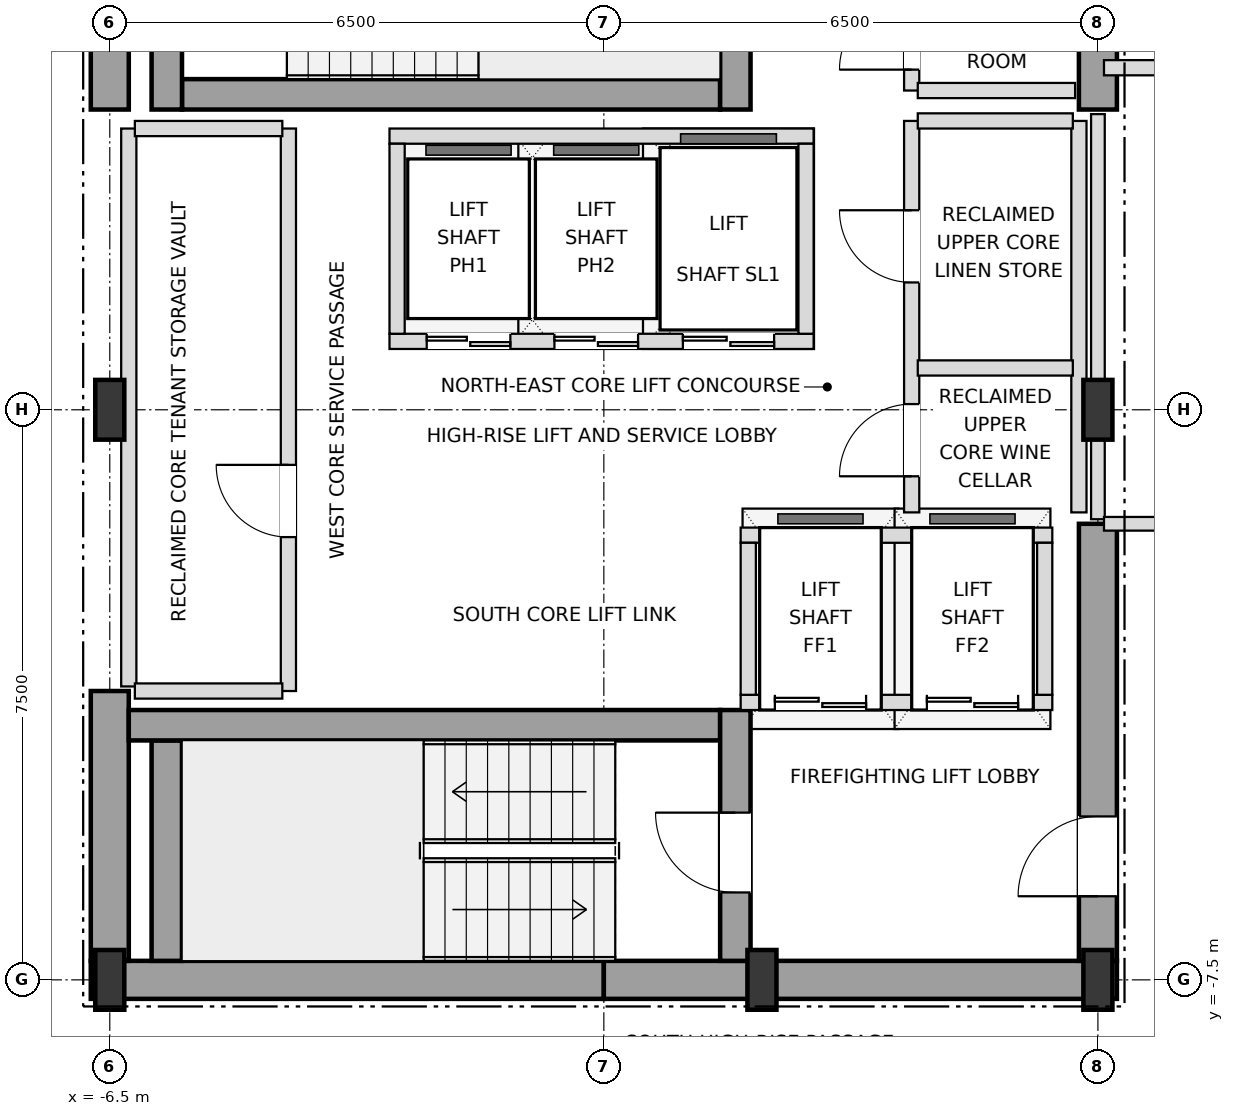
"""IFC4 building model, lengths in metres.
Left out: names, types, materials, properties, quantities, classifications, styles, units other than length and angle.
Written with IfcOpenShell. Run it as: python <this file> out.ifc"""

import sys

from ifc_helpers import new_model, si_unit, direction, frame, frame_2d, origin, origin_2d, place, context, subcontext, project, spatial, rectangle, i_section, extrude, element, fill, save


model = new_model("IFC4")
c1 = context("Model", 3, precision=1e-05, world=origin(), true_north=direction((0.0, 1.0)))
c2 = subcontext(c1, "Body", "Model", "MODEL_VIEW")
j1 = project(units=[si_unit("LENGTHUNIT", "METRE"), si_unit("PLANEANGLEUNIT", "RADIAN")], contexts=[c1])
p1 = place(None, origin())
s1 = spatial("IfcSite", under=j1, at=p1, CompositionType="ELEMENT")
p2 = place(p1, origin())
s2 = spatial("IfcBuilding", under=s1, at=p2, CompositionType="ELEMENT")
p3 = place(p2, frame((0.0, 0.0, 297.9)))
s3 = spatial("IfcBuildingStorey", under=s2, at=p3, CompositionType="ELEMENT", Elevation=297.9)
for number, where, z_axis, x_axis in (
    (1, (-6.5, -7.5, 0.0), (0.0, 0.0, 1.0), (1.0, 0.0, 0.0)),
    (2, (2.08, -7.5, 0.0), (0.0, 0.0, 1.0), (1.0, 0.0, 0.0)),
    (3, (6.5, -7.5, 0.0), (0.0, 0.0, 1.0), (1.0, 0.0, 0.0)),
    (4, (-6.5, 0.0, 0.0), (0.0, 0.0, 1.0), (1.0, 0.0, 0.0)),
    (5, (6.5, 0.0, 0.0), (0.0, 0.0, 1.0), (1.0, 0.0, 0.0)),
):
    element("IfcColumn", number, at=place(p3, frame(where, z_axis=z_axis, x_axis=x_axis)), inside=s3, PredefinedType="COLUMN", context=c2, shape_type="SweptSolid", body=[
        extrude(i_section(OverallWidth=0.382, OverallDepth=0.786, WebThickness=0.02, FlangeThickness=0.033, at=origin_2d()), origin(), (0.0, 0.0, 1.0), 3.6),
    ])
for number, where, z_axis, x_axis in (
    (6, (-6.75, -7.5, 0.0), (0.0, 0.0, 1.0), (1.0, 0.0, 0.0)),
    (7, (0.0, -7.5, 0.0), (0.0, 0.0, 1.0), (1.0, 0.0, 0.0)),
):
    element("IfcWall", number, at=place(p3, frame(where, z_axis=z_axis, x_axis=x_axis)), inside=s3, PredefinedType="SHEAR", context=c2, shape_type="SweptSolid", body=[
        extrude(rectangle(XDim=6.75, YDim=0.5, at=frame_2d((3.375, 0.0))), origin(), (0.0, 0.0, 1.0), 3.38),
    ])
p4 = place(p3, frame((-6.5, -7.25, 0.0), z_axis=(0.0, 0.0, 1.0), x_axis=(0.0, 1.0, 0.0)))
e8 = element("IfcWall", 8, at=p4, inside=s3, PredefinedType="SHEAR", context=c2, shape_type="SweptSolid", body=[
    extrude(rectangle(XDim=3.55, YDim=0.5, at=frame_2d((1.775, 0.0))), origin(), (0.0, 0.0, 1.0), 3.38),
])
p5 = place(p3, frame((-6.5, 3.95, 0.0), z_axis=(0.0, 0.0, 1.0), x_axis=(0.0, 1.0, 0.0)))
e9 = element("IfcWall", 9, at=p5, inside=s3, PredefinedType="SHEAR", context=c2, shape_type="SweptSolid", body=[
    extrude(rectangle(XDim=3.3, YDim=0.5, at=frame_2d((1.65, 0.0))), origin(), (0.0, 0.0, 1.0), 3.38),
])
p6 = place(p3, frame((6.5, -7.25, 0.0), z_axis=(0.0, 0.0, 1.0), x_axis=(0.0, 1.0, 0.0)))
e10 = element("IfcWall", 10, at=p6, inside=s3, PredefinedType="SHEAR", context=c2, shape_type="SweptSolid", body=[
    extrude(rectangle(XDim=5.75, YDim=0.5, at=frame_2d((2.875, 0.0))), origin(), (0.0, 0.0, 1.0), 3.38),
])
p7 = place(p6, frame((0.85, 0.0, 0.0)))
e11 = element("IfcOpeningElement", 11, at=p7, cuts=e10, PredefinedType="OPENING", context=c2, shape_type="SweptSolid", body=[
    extrude(rectangle(XDim=1.05, YDim=2.15, at=frame_2d((0.525, 1.075))), frame((0.0, 0.26, 0.0), z_axis=(0.0, -1.0, 0.0), x_axis=(1.0, 0.0, 0.0)), (0.0, 0.0, 1.0), 0.52),
])
p8 = place(p3, frame((6.5, 3.95, 0.0), z_axis=(0.0, 0.0, 1.0), x_axis=(0.0, 1.0, 0.0)))
e12 = element("IfcWall", 12, at=p8, inside=s3, PredefinedType="SHEAR", context=c2, shape_type="SweptSolid", body=[
    extrude(rectangle(XDim=3.3, YDim=0.5, at=frame_2d((1.65, 0.0))), origin(), (0.0, 0.0, 1.0), 3.38),
])
p9 = place(p3, frame((-5.75, -7.25, 0.0), z_axis=(0.0, 0.0, 1.0), x_axis=(0.0, 1.0, 0.0)))
e13 = element("IfcWall", 13, at=p9, inside=s3, PredefinedType="SHEAR", context=c2, shape_type="SweptSolid", body=[
    extrude(rectangle(XDim=2.9, YDim=0.4, at=frame_2d((1.45, 0.0))), origin(), (0.0, 0.0, 1.0), 3.38),
])
p10 = place(p3, frame((-6.25, -4.15, 0.0), z_axis=(0.0, 0.0, 1.0), x_axis=(1.0, 0.0, 0.0)))
e14 = element("IfcWall", 14, at=p10, inside=s3, PredefinedType="SHEAR", context=c2, shape_type="SweptSolid", body=[
    extrude(rectangle(XDim=7.78, YDim=0.4, at=frame_2d((3.89, 0.0))), origin(), (0.0, 0.0, 1.0), 3.38),
])
p11 = place(p3, frame((1.73, -7.25, 0.0), z_axis=(0.0, 0.0, 1.0), x_axis=(0.0, 1.0, 0.0)))
e15 = element("IfcWall", 15, at=p11, inside=s3, PredefinedType="SHEAR", context=c2, shape_type="SweptSolid", body=[
    extrude(rectangle(XDim=3.3, YDim=0.4, at=frame_2d((1.65, 0.0))), origin(), (0.0, 0.0, 1.0), 3.38),
])
p12 = place(p11, frame((0.9, 0.0, 0.0)))
e16 = element("IfcOpeningElement", 16, at=p12, cuts=e15, PredefinedType="OPENING", context=c2, shape_type="SweptSolid", body=[
    extrude(rectangle(XDim=1.05, YDim=2.15, at=frame_2d((0.525, 1.075))), frame((0.0, 0.21, 0.0), z_axis=(0.0, -1.0, 0.0), x_axis=(1.0, 0.0, 0.0)), (0.0, 0.0, 1.0), 0.42),
])
p13 = place(p3, frame((-5.55, 4.15, 0.0), z_axis=(0.0, 0.0, 1.0), x_axis=(1.0, 0.0, 0.0)))
e17 = element("IfcWall", 17, at=p13, inside=s3, PredefinedType="SHEAR", context=c2, shape_type="SweptSolid", body=[
    extrude(rectangle(XDim=7.08, YDim=0.4, at=frame_2d((3.54, 0.0))), origin(), (0.0, 0.0, 1.0), 3.38),
])
for number, where, z_axis, x_axis in (
    (18, (1.73, 3.95, 0.0), (0.0, 0.0, 1.0), (0.0, 1.0, 0.0)),
    (19, (-5.75, 3.95, 0.0), (0.0, 0.0, 1.0), (0.0, 1.0, 0.0)),
):
    element("IfcWall", number, at=place(p3, frame(where, z_axis=z_axis, x_axis=x_axis)), inside=s3, PredefinedType="SHEAR", context=c2, shape_type="SweptSolid", body=[
        extrude(rectangle(XDim=3.3, YDim=0.4, at=frame_2d((1.65, 0.0))), origin(), (0.0, 0.0, 1.0), 3.38),
    ])
p14 = place(p3, frame((-2.82, 0.9, 0.0), z_axis=(0.0, 0.0, 1.0), x_axis=(1.0, 0.0, 0.0)))
e20 = element("IfcWall", 20, at=p14, inside=s3, PredefinedType="SOLIDWALL", context=c2, shape_type="SweptSolid", body=[
    extrude(rectangle(XDim=5.58, YDim=0.2, at=frame_2d((2.79, 0.0))), origin(), (0.0, 0.0, 1.0), 3.38),
])
p15 = place(p14, frame((0.49, 0.0, 0.0)))
e21 = element("IfcOpeningElement", 21, at=p15, cuts=e20, PredefinedType="OPENING", context=c2, shape_type="SweptSolid", body=[
    extrude(rectangle(XDim=1.1, YDim=2.15, at=frame_2d((0.55, 1.075))), frame((0.0, 0.11, 0.0), z_axis=(0.0, -1.0, 0.0), x_axis=(1.0, 0.0, 0.0)), (0.0, 0.0, 1.0), 0.22),
])
p16 = place(p14, frame((2.17, 0.0, 0.0)))
e22 = element("IfcOpeningElement", 22, at=p16, cuts=e20, PredefinedType="OPENING", context=c2, shape_type="SweptSolid", body=[
    extrude(rectangle(XDim=1.1, YDim=2.15, at=frame_2d((0.55, 1.075))), frame((0.0, 0.11, 0.0), z_axis=(0.0, -1.0, 0.0), x_axis=(1.0, 0.0, 0.0)), (0.0, 0.0, 1.0), 0.22),
])
p17 = place(p14, frame((3.86, 0.0, 0.0)))
e23 = element("IfcOpeningElement", 23, at=p17, cuts=e20, PredefinedType="OPENING", context=c2, shape_type="SweptSolid", body=[
    extrude(rectangle(XDim=1.2, YDim=2.2, at=frame_2d((0.6, 1.1))), frame((0.0, 0.11, 0.0), z_axis=(0.0, -1.0, 0.0), x_axis=(1.0, 0.0, 0.0)), (0.0, 0.0, 1.0), 0.22),
])
p18 = place(p3, frame((-2.82, 3.6, 0.0), z_axis=(0.0, 0.0, 1.0), x_axis=(1.0, 0.0, 0.0)))
e24 = element("IfcWall", 24, at=p18, inside=s3, PredefinedType="SOLIDWALL", context=c2, shape_type="SweptSolid", body=[
    extrude(rectangle(XDim=5.58, YDim=0.2, at=frame_2d((2.79, 0.0))), origin(), (0.0, 0.0, 1.0), 3.38),
])
for number, where, z_axis, x_axis in (
    (25, (-2.72, 1.0, 0.0), (0.0, 0.0, 1.0), (0.0, 1.0, 0.0)),
    (26, (2.66, 1.0, 0.0), (0.0, 0.0, 1.0), (0.0, 1.0, 0.0)),
):
    element("IfcWall", number, at=place(p3, frame(where, z_axis=z_axis, x_axis=x_axis)), inside=s3, PredefinedType="SOLIDWALL", context=c2, shape_type="SweptSolid", body=[
        extrude(rectangle(XDim=2.5, YDim=0.2, at=frame_2d((1.25, 0.0))), origin(), (0.0, 0.0, 1.0), 3.38),
    ])
p19 = place(p3, frame((1.8, -3.85, 0.0), z_axis=(0.0, 0.0, 1.0), x_axis=(1.0, 0.0, 0.0)))
e27 = element("IfcWall", 27, at=p19, inside=s3, PredefinedType="SOLIDWALL", context=c2, shape_type="SweptSolid", body=[
    extrude(rectangle(XDim=4.1, YDim=0.2, at=frame_2d((2.05, 0.0))), origin(), (0.0, 0.0, 1.0), 3.38),
])
p20 = place(p19, frame((0.45, 0.0, 0.0)))
e28 = element("IfcOpeningElement", 28, at=p20, cuts=e27, PredefinedType="OPENING", context=c2, shape_type="SweptSolid", body=[
    extrude(rectangle(XDim=1.2, YDim=2.2, at=frame_2d((0.6, 1.1))), frame((0.0, 0.11, 0.0), z_axis=(0.0, -1.0, 0.0), x_axis=(1.0, 0.0, 0.0)), (0.0, 0.0, 1.0), 0.22),
])
p21 = place(p19, frame((2.45, 0.0, 0.0)))
e29 = element("IfcOpeningElement", 29, at=p21, cuts=e27, PredefinedType="OPENING", context=c2, shape_type="SweptSolid", body=[
    extrude(rectangle(XDim=1.2, YDim=2.2, at=frame_2d((0.6, 1.1))), frame((0.0, 0.11, 0.0), z_axis=(0.0, -1.0, 0.0), x_axis=(1.0, 0.0, 0.0)), (0.0, 0.0, 1.0), 0.22),
])
p22 = place(p3, frame((1.8, -1.65, 0.0), z_axis=(0.0, 0.0, 1.0), x_axis=(1.0, 0.0, 0.0)))
e30 = element("IfcWall", 30, at=p22, inside=s3, PredefinedType="SOLIDWALL", context=c2, shape_type="SweptSolid", body=[
    extrude(rectangle(XDim=4.1, YDim=0.2, at=frame_2d((2.05, 0.0))), origin(), (0.0, 0.0, 1.0), 3.38),
])
for number, where, z_axis, x_axis in (
    (31, (1.9, -3.75, 0.0), (0.0, 0.0, 1.0), (0.0, 1.0, 0.0)),
    (32, (5.8, -3.75, 0.0), (0.0, 0.0, 1.0), (0.0, 1.0, 0.0)),
):
    element("IfcWall", number, at=place(p3, frame(where, z_axis=z_axis, x_axis=x_axis)), inside=s3, PredefinedType="SOLIDWALL", context=c2, shape_type="SweptSolid", body=[
        extrude(rectangle(XDim=2.0, YDim=0.2, at=frame_2d((1.0, 0.0))), origin(), (0.0, 0.0, 1.0), 3.38),
    ])
p23 = place(p3, frame((-6.25, -3.64, 0.0), z_axis=(0.0, 0.0, 1.0), x_axis=(0.0, 1.0, 0.0)))
e33 = element("IfcWall", 33, at=p23, inside=s3, PredefinedType="SOLIDWALL", context=c2, shape_type="SweptSolid", body=[
    extrude(rectangle(XDim=7.34, YDim=0.2, at=frame_2d((3.67, 0.0))), origin(), (0.0, 0.0, 1.0), 3.38),
])
p24 = place(p3, frame((-4.15, -3.7, 0.0), z_axis=(0.0, 0.0, 1.0), x_axis=(0.0, 1.0, 0.0)))
e34 = element("IfcWall", 34, at=p24, inside=s3, PredefinedType="SOLIDWALL", context=c2, shape_type="SweptSolid", body=[
    extrude(rectangle(XDim=7.4, YDim=0.2, at=frame_2d((3.7, 0.0))), origin(), (0.0, 0.0, 1.0), 3.38),
])
p25 = place(p24, frame((2.025, 0.0, 0.0)))
e35 = element("IfcOpeningElement", 35, at=p25, cuts=e34, PredefinedType="OPENING", context=c2, shape_type="SweptSolid", body=[
    extrude(rectangle(XDim=0.95, YDim=2.15, at=frame_2d((0.475, 1.075))), frame((0.0, 0.11, 0.0), z_axis=(0.0, -1.0, 0.0), x_axis=(1.0, 0.0, 0.0)), (0.0, 0.0, 1.0), 0.22),
])
p26 = place(p3, frame((4.05, -1.35, 0.0), z_axis=(0.0, 0.0, 1.0), x_axis=(0.0, 1.0, 0.0)))
e36 = element("IfcWall", 36, at=p26, inside=s3, PredefinedType="SOLIDWALL", context=c2, shape_type="SweptSolid", body=[
    extrude(rectangle(XDim=5.15, YDim=0.2, at=frame_2d((2.575, 0.0))), origin(), (0.0, 0.0, 1.0), 3.38),
])
p27 = place(p26, frame((0.475, 0.0, 0.0)))
e37 = element("IfcOpeningElement", 37, at=p27, cuts=e36, PredefinedType="OPENING", context=c2, shape_type="SweptSolid", body=[
    extrude(rectangle(XDim=0.95, YDim=2.15, at=frame_2d((0.475, 1.075))), frame((0.0, 0.11, 0.0), z_axis=(0.0, -1.0, 0.0), x_axis=(1.0, 0.0, 0.0)), (0.0, 0.0, 1.0), 0.22),
])
p28 = place(p26, frame((3.025, 0.0, 0.0)))
e38 = element("IfcOpeningElement", 38, at=p28, cuts=e36, PredefinedType="OPENING", context=c2, shape_type="SweptSolid", body=[
    extrude(rectangle(XDim=0.95, YDim=2.15, at=frame_2d((0.475, 1.075))), frame((0.0, 0.11, 0.0), z_axis=(0.0, -1.0, 0.0), x_axis=(1.0, 0.0, 0.0)), (0.0, 0.0, 1.0), 0.22),
])
p29 = place(p3, frame((4.05, 4.2, 0.0), z_axis=(0.0, 0.0, 1.0), x_axis=(0.0, 1.0, 0.0)))
e39 = element("IfcWall", 39, at=p29, inside=s3, PredefinedType="SOLIDWALL", context=c2, shape_type="SweptSolid", body=[
    extrude(rectangle(XDim=3.05, YDim=0.2, at=frame_2d((1.525, 0.0))), origin(), (0.0, 0.0, 1.0), 3.38),
])
p30 = place(p29, frame((0.275, 0.0, 0.0)))
e40 = element("IfcOpeningElement", 40, at=p30, cuts=e39, PredefinedType="OPENING", context=c2, shape_type="SweptSolid", body=[
    extrude(rectangle(XDim=0.95, YDim=2.15, at=frame_2d((0.475, 1.075))), frame((0.0, 0.11, 0.0), z_axis=(0.0, -1.0, 0.0), x_axis=(1.0, 0.0, 0.0)), (0.0, 0.0, 1.0), 0.22),
])
p31 = place(p29, frame((1.775, 0.0, 0.0)))
e41 = element("IfcOpeningElement", 41, at=p31, cuts=e39, PredefinedType="OPENING", context=c2, shape_type="SweptSolid", body=[
    extrude(rectangle(XDim=0.95, YDim=2.15, at=frame_2d((0.475, 1.075))), frame((0.0, 0.11, 0.0), z_axis=(0.0, -1.0, 0.0), x_axis=(1.0, 0.0, 0.0)), (0.0, 0.0, 1.0), 0.22),
])
p32 = place(p3, frame((6.25, -1.35, 0.0), z_axis=(0.0, 0.0, 1.0), x_axis=(0.0, 1.0, 0.0)))
e42 = element("IfcWall", 42, at=p32, inside=s3, PredefinedType="SOLIDWALL", context=c2, shape_type="SweptSolid", body=[
    extrude(rectangle(XDim=5.15, YDim=0.2, at=frame_2d((2.575, 0.0))), origin(), (0.0, 0.0, 1.0), 3.38),
])
p33 = place(p3, frame((6.5, -1.44, 0.0), z_axis=(0.0, 0.0, 1.0), x_axis=(0.0, 1.0, 0.0)))
e43 = element("IfcWall", 43, at=p33, inside=s3, PredefinedType="PARTITIONING", context=c2, shape_type="SweptSolid", body=[
    extrude(rectangle(XDim=5.33, YDim=0.18, at=frame_2d((2.665, 0.0))), origin(), (0.0, 0.0, 1.0), 2.826),
])
p34 = place(p3, frame((-6.17, -3.7, 0.0), z_axis=(0.0, 0.0, 1.0), x_axis=(1.0, 0.0, 0.0)))
e44 = element("IfcWall", 44, at=p34, inside=s3, PredefinedType="SOLIDWALL", context=c2, shape_type="SweptSolid", body=[
    extrude(rectangle(XDim=1.94, YDim=0.2, at=frame_2d((0.97, 0.0))), origin(), (0.0, 0.0, 1.0), 3.38),
])
p35 = place(p3, frame((6.58, -1.5, 0.0), z_axis=(0.0, 0.0, 1.0), x_axis=(1.0, 0.0, 0.0)))
e45 = element("IfcWall", 45, at=p35, inside=s3, PredefinedType="PARTITIONING", context=c2, shape_type="SweptSolid", body=[
    extrude(rectangle(XDim=1.64, YDim=0.18, at=frame_2d((0.82, 0.0))), origin(), (0.0, 0.0, 1.0), 3.38),
])
p36 = place(p3, frame((4.13, 0.55, 0.0), z_axis=(0.0, 0.0, 1.0), x_axis=(1.0, 0.0, 0.0)))
e46 = element("IfcWall", 46, at=p36, inside=s3, PredefinedType="SOLIDWALL", context=c2, shape_type="SweptSolid", body=[
    extrude(rectangle(XDim=2.04, YDim=0.2, at=frame_2d((1.02, 0.0))), origin(), (0.0, 0.0, 1.0), 3.38),
])
p37 = place(p3, frame((-6.17, 3.7, 0.0), z_axis=(0.0, 0.0, 1.0), x_axis=(1.0, 0.0, 0.0)))
e47 = element("IfcWall", 47, at=p37, inside=s3, PredefinedType="SOLIDWALL", context=c2, shape_type="SweptSolid", body=[
    extrude(rectangle(XDim=1.94, YDim=0.2, at=frame_2d((0.97, 0.0))), origin(), (0.0, 0.0, 1.0), 3.38),
])
p38 = place(p3, frame((4.13, 3.8, 0.0), z_axis=(0.0, 0.0, 1.0), x_axis=(1.0, 0.0, 0.0)))
e48 = element("IfcWall", 48, at=p38, inside=s3, PredefinedType="SOLIDWALL", context=c2, shape_type="SweptSolid", body=[
    extrude(rectangle(XDim=2.04, YDim=0.2, at=frame_2d((1.02, 0.0))), origin(), (0.0, 0.0, 1.0), 3.38),
])
p39 = place(p3, frame((4.13, 4.2, 0.0), z_axis=(0.0, 0.0, 1.0), x_axis=(1.0, 0.0, 0.0)))
e49 = element("IfcWall", 49, at=p39, inside=s3, PredefinedType="SOLIDWALL", context=c2, shape_type="SweptSolid", body=[
    extrude(rectangle(XDim=2.07, YDim=0.2, at=frame_2d((1.035, 0.0))), origin(), (0.0, 0.0, 1.0), 3.38),
])
p40 = place(p3, frame((6.58, 4.5, 0.0), z_axis=(0.0, 0.0, 1.0), x_axis=(1.0, 0.0, 0.0)))
e50 = element("IfcWall", 50, at=p40, inside=s3, PredefinedType="SOLIDWALL", context=c2, shape_type="SweptSolid", body=[
    extrude(rectangle(XDim=4.74, YDim=0.2, at=frame_2d((2.37, 0.0))), origin(), (0.0, 0.0, 1.0), 3.38),
])
p41 = place(p40, frame((1.845, 0.0, 0.0)))
e51 = element("IfcOpeningElement", 51, at=p41, cuts=e50, PredefinedType="OPENING", context=c2, shape_type="SweptSolid", body=[
    extrude(rectangle(XDim=0.95, YDim=2.15, at=frame_2d((0.475, 1.075))), frame((0.0, 0.11, 0.0), z_axis=(0.0, -1.0, 0.0), x_axis=(1.0, 0.0, 0.0)), (0.0, 0.0, 1.0), 0.22),
])
p42 = place(p7, origin())
e52 = element("IfcDoor", 52, at=p42, inside=s3, OperationType="SINGLE_SWING_LEFT", PredefinedType="DOOR", context=c2, shape_type="SweptSolid", body=[
    extrude(rectangle(XDim=1.05, YDim=2.15, at=frame_2d((0.525, 1.075))), frame((0.0, 0.025, 0.0), z_axis=(0.0, -1.0, 0.0), x_axis=(1.0, 0.0, 0.0)), (0.0, 0.0, 1.0), 0.05),
])
fill(e11, e52)
p43 = place(p12, origin())
e53 = element("IfcDoor", 53, at=p43, inside=s3, OperationType="SINGLE_SWING_RIGHT", PredefinedType="DOOR", context=c2, shape_type="SweptSolid", body=[
    extrude(rectangle(XDim=1.05, YDim=2.15, at=frame_2d((0.525, 1.075))), frame((0.0, 0.025, 0.0), z_axis=(0.0, -1.0, 0.0), x_axis=(1.0, 0.0, 0.0)), (0.0, 0.0, 1.0), 0.05),
])
fill(e16, e53)
p44 = place(p15, origin())
e54 = element("IfcDoor", 54, at=p44, inside=s3, OperationType="DOUBLE_DOOR_SLIDING", PredefinedType="DOOR", context=c2, shape_type="SweptSolid", body=[
    extrude(rectangle(XDim=1.1, YDim=2.15, at=frame_2d((0.55, 1.075))), frame((0.0, 0.025, 0.0), z_axis=(0.0, -1.0, 0.0), x_axis=(1.0, 0.0, 0.0)), (0.0, 0.0, 1.0), 0.05),
])
fill(e21, e54)
p45 = place(p16, origin())
e55 = element("IfcDoor", 55, at=p45, inside=s3, OperationType="DOUBLE_DOOR_SLIDING", PredefinedType="DOOR", context=c2, shape_type="SweptSolid", body=[
    extrude(rectangle(XDim=1.1, YDim=2.15, at=frame_2d((0.55, 1.075))), frame((0.0, 0.025, 0.0), z_axis=(0.0, -1.0, 0.0), x_axis=(1.0, 0.0, 0.0)), (0.0, 0.0, 1.0), 0.05),
])
fill(e22, e55)
p46 = place(p17, origin())
e56 = element("IfcDoor", 56, at=p46, inside=s3, OperationType="DOUBLE_DOOR_SLIDING", PredefinedType="DOOR", context=c2, shape_type="SweptSolid", body=[
    extrude(rectangle(XDim=1.2, YDim=2.2, at=frame_2d((0.6, 1.1))), frame((0.0, 0.025, 0.0), z_axis=(0.0, -1.0, 0.0), x_axis=(1.0, 0.0, 0.0)), (0.0, 0.0, 1.0), 0.05),
])
fill(e23, e56)
p47 = place(p20, origin())
e57 = element("IfcDoor", 57, at=p47, inside=s3, OperationType="DOUBLE_DOOR_SLIDING", PredefinedType="DOOR", context=c2, shape_type="SweptSolid", body=[
    extrude(rectangle(XDim=1.2, YDim=2.2, at=frame_2d((0.6, 1.1))), frame((0.0, 0.025, 0.0), z_axis=(0.0, -1.0, 0.0), x_axis=(1.0, 0.0, 0.0)), (0.0, 0.0, 1.0), 0.05),
])
fill(e28, e57)
p48 = place(p21, origin())
e58 = element("IfcDoor", 58, at=p48, inside=s3, OperationType="DOUBLE_DOOR_SLIDING", PredefinedType="DOOR", context=c2, shape_type="SweptSolid", body=[
    extrude(rectangle(XDim=1.2, YDim=2.2, at=frame_2d((0.6, 1.1))), frame((0.0, 0.025, 0.0), z_axis=(0.0, -1.0, 0.0), x_axis=(1.0, 0.0, 0.0)), (0.0, 0.0, 1.0), 0.05),
])
fill(e29, e58)
p49 = place(p25, origin())
e59 = element("IfcDoor", 59, at=p49, inside=s3, OperationType="SINGLE_SWING_RIGHT", PredefinedType="DOOR", context=c2, shape_type="SweptSolid", body=[
    extrude(rectangle(XDim=0.95, YDim=2.15, at=frame_2d((0.475, 1.075))), frame((0.0, 0.025, 0.0), z_axis=(0.0, -1.0, 0.0), x_axis=(1.0, 0.0, 0.0)), (0.0, 0.0, 1.0), 0.05),
])
fill(e35, e59)
p50 = place(p27, origin())
e60 = element("IfcDoor", 60, at=p50, inside=s3, OperationType="SINGLE_SWING_LEFT", PredefinedType="DOOR", context=c2, shape_type="SweptSolid", body=[
    extrude(rectangle(XDim=0.95, YDim=2.15, at=frame_2d((0.475, 1.075))), frame((0.0, 0.025, 0.0), z_axis=(0.0, -1.0, 0.0), x_axis=(1.0, 0.0, 0.0)), (0.0, 0.0, 1.0), 0.05),
])
fill(e37, e60)
p51 = place(p28, origin())
e61 = element("IfcDoor", 61, at=p51, inside=s3, OperationType="SINGLE_SWING_RIGHT", PredefinedType="DOOR", context=c2, shape_type="SweptSolid", body=[
    extrude(rectangle(XDim=0.95, YDim=2.15, at=frame_2d((0.475, 1.075))), frame((0.0, 0.025, 0.0), z_axis=(0.0, -1.0, 0.0), x_axis=(1.0, 0.0, 0.0)), (0.0, 0.0, 1.0), 0.05),
])
fill(e38, e61)
p52 = place(p30, origin())
e62 = element("IfcDoor", 62, at=p52, inside=s3, OperationType="SINGLE_SWING_LEFT", PredefinedType="DOOR", context=c2, shape_type="SweptSolid", body=[
    extrude(rectangle(XDim=0.95, YDim=2.15, at=frame_2d((0.475, 1.075))), frame((0.0, 0.025, 0.0), z_axis=(0.0, -1.0, 0.0), x_axis=(1.0, 0.0, 0.0)), (0.0, 0.0, 1.0), 0.05),
])
fill(e40, e62)
save(model, sys.argv[1])
